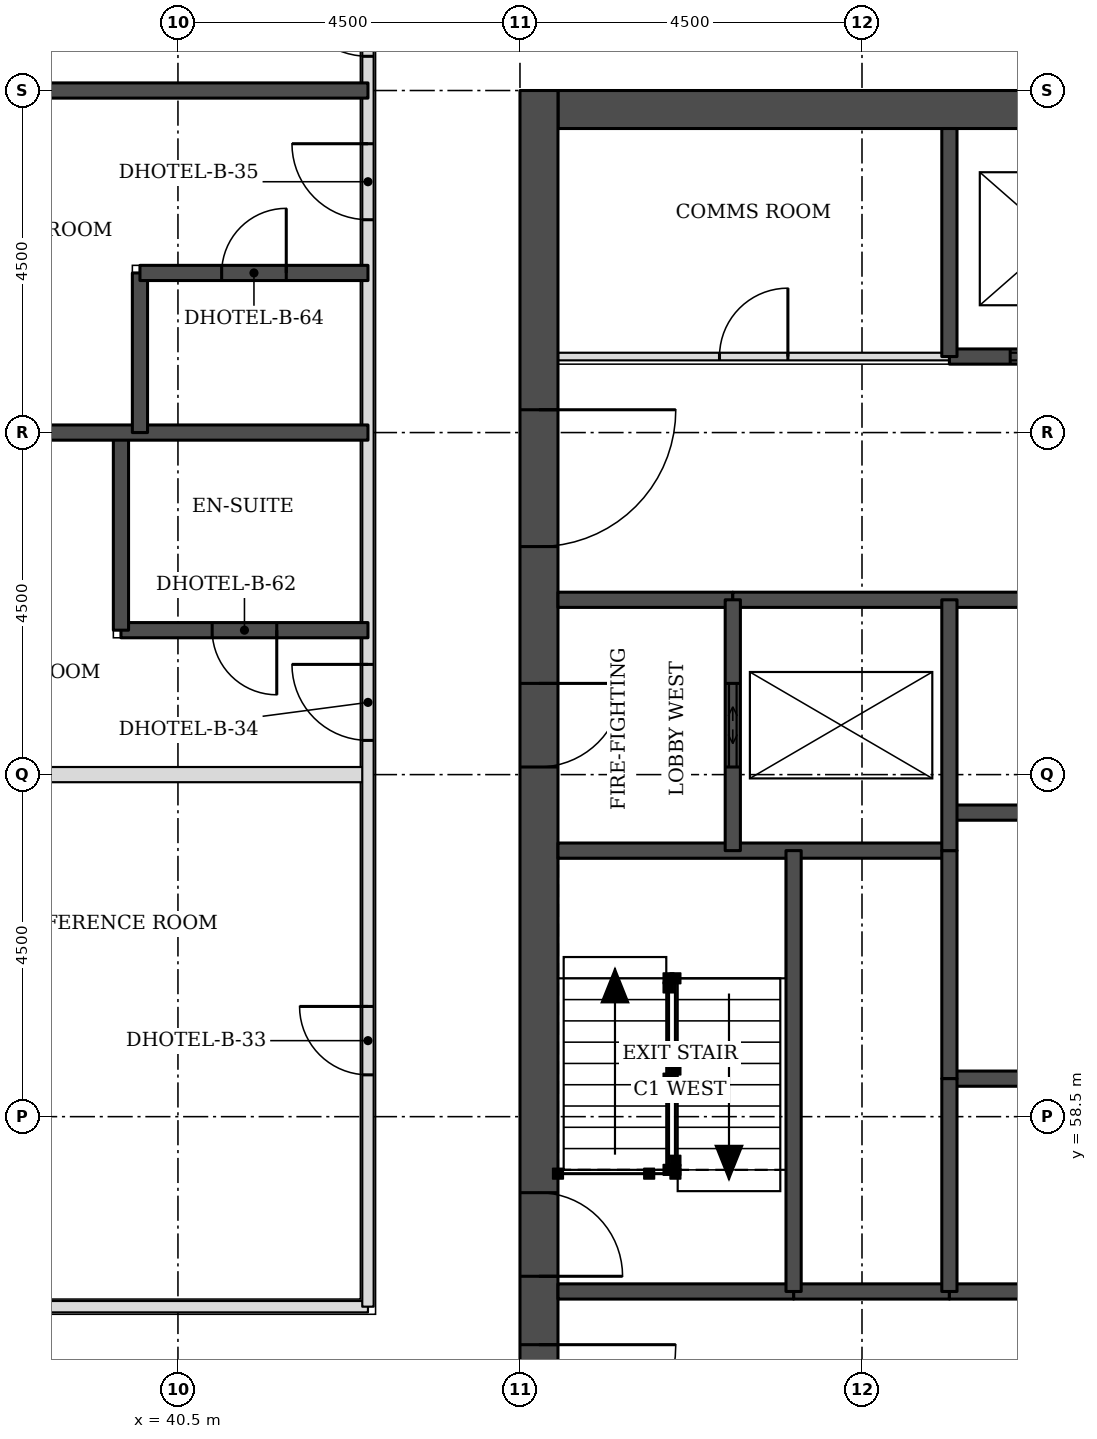
"""IFC4 building model, lengths in metres.
Left out: names, types, materials, properties, quantities, classifications, styles, units other than length and angle.
Written with IfcOpenShell. Run it as: python <this file> out.ifc"""

import sys

from ifc_helpers import new_model, si_unit, direction, frame, frame_2d, origin, place, context, subcontext, project, spatial, rectangle, extrude, element, fill, save


model = new_model("IFC4")
c1 = context("Model", 3, precision=1e-05, world=origin(), true_north=direction((0.0, 1.0)))
c2 = subcontext(c1, "Body", "Model", "MODEL_VIEW")
j1 = project(units=[si_unit("LENGTHUNIT", "METRE"), si_unit("PLANEANGLEUNIT", "RADIAN")], contexts=[c1])
p1 = place(None, origin())
s1 = spatial("IfcSite", under=j1, at=p1, CompositionType="ELEMENT")
p2 = place(p1, origin())
s2 = spatial("IfcBuilding", under=s1, at=p2, CompositionType="ELEMENT")
p3 = place(p2, frame((0.0, 0.0, 29.7)))
s3 = spatial("IfcBuildingStorey", under=s2, at=p3, CompositionType="ELEMENT", Elevation=29.7)
p4 = place(p3, frame((45.5, 71.75, 0.0), z_axis=(0.0, 0.0, 1.0), x_axis=(1.0, 0.0, 0.0)))
e1 = element("IfcWall", 1, at=p4, inside=s3, PredefinedType="SHEAR", context=c2, shape_type="SweptSolid", body=[
    extrude(rectangle(XDim=21.5, YDim=0.5, at=frame_2d((10.75, 0.0))), origin(), (0.0, 0.0, 1.0), 3.3),
])
p5 = place(p3, frame((45.25, 49.5, 0.0), z_axis=(0.0, 0.0, 1.0), x_axis=(0.0, 1.0, 0.0)))
e2 = element("IfcWall", 2, at=p5, inside=s3, PredefinedType="SHEAR", context=c2, shape_type="SweptSolid", body=[
    extrude(rectangle(XDim=22.5, YDim=0.5, at=frame_2d((11.25, 0.0))), origin(), (0.0, 0.0, 1.0), 3.3),
])
p6 = place(p5, frame((4.2, 0.0, 0.0)))
e3 = element("IfcOpeningElement", 3, at=p6, cuts=e2, PredefinedType="OPENING", context=c2, shape_type="SweptSolid", body=[
    extrude(rectangle(XDim=1.8, YDim=2.1, at=frame_2d((0.9, 1.05))), frame((0.0, 0.26, 0.0), z_axis=(0.0, -1.0, 0.0), x_axis=(1.0, 0.0, 0.0)), (0.0, 0.0, 1.0), 0.52),
])
p7 = place(p5, frame((6.9, 0.0, 0.0)))
e4 = element("IfcOpeningElement", 4, at=p7, cuts=e2, PredefinedType="OPENING", context=c2, shape_type="SweptSolid", body=[
    extrude(rectangle(XDim=1.1, YDim=2.1, at=frame_2d((0.55, 1.05))), frame((0.0, 0.26, 0.0), z_axis=(0.0, -1.0, 0.0), x_axis=(1.0, 0.0, 0.0)), (0.0, 0.0, 1.0), 0.52),
])
p8 = place(p5, frame((13.6, 0.0, 0.0)))
e5 = element("IfcOpeningElement", 5, at=p8, cuts=e2, PredefinedType="OPENING", context=c2, shape_type="SweptSolid", body=[
    extrude(rectangle(XDim=1.1, YDim=2.1, at=frame_2d((0.55, 1.05))), frame((0.0, 0.26, 0.0), z_axis=(0.0, -1.0, 0.0), x_axis=(1.0, 0.0, 0.0)), (0.0, 0.0, 1.0), 0.52),
])
p9 = place(p5, frame((16.5, 0.0, 0.0)))
e6 = element("IfcOpeningElement", 6, at=p9, cuts=e2, PredefinedType="OPENING", context=c2, shape_type="SweptSolid", body=[
    extrude(rectangle(XDim=1.8, YDim=2.1, at=frame_2d((0.9, 1.05))), frame((0.0, 0.26, 0.0), z_axis=(0.0, -1.0, 0.0), x_axis=(1.0, 0.0, 0.0)), (0.0, 0.0, 1.0), 0.52),
])
p10 = place(p3, frame((36.6, 63.0, 0.0), z_axis=(0.0, 0.0, 1.0), x_axis=(1.0, 0.0, 0.0)))
e7 = element("IfcWall", 7, at=p10, inside=s3, PredefinedType="PARTITIONING", context=c2, shape_type="SweptSolid", body=[
    extrude(rectangle(XDim=6.4, YDim=0.2, at=frame_2d((3.2, 0.0))), origin(), (0.0, 0.0, 1.0), 3.08),
])
p11 = place(p3, frame((27.0, 56.0, 0.0), z_axis=(0.0, 0.0, 1.0), x_axis=(1.0, 0.0, 0.0)))
e8 = element("IfcWall", 8, at=p11, inside=s3, PredefinedType="PARTITIONING", context=c2, shape_type="SweptSolid", body=[
    extrude(rectangle(XDim=16.0, YDim=0.15, at=frame_2d((8.0, 0.0))), origin(), (0.0, 0.0, 1.0), 3.08),
])
p12 = place(p11, frame((5.6, 0.0, 0.0)))
e9 = element("IfcOpeningElement", 9, at=p12, cuts=e8, PredefinedType="OPENING", context=c2, shape_type="SweptSolid", body=[
    extrude(rectangle(XDim=1.0, YDim=2.1, at=frame_2d((0.5, 1.05))), frame((0.0, 0.085, 0.0), z_axis=(0.0, -1.0, 0.0), x_axis=(1.0, 0.0, 0.0)), (0.0, 0.0, 1.0), 0.17),
])
p13 = place(p3, frame((43.0, 56.0, 0.0), z_axis=(0.0, 0.0, 1.0), x_axis=(0.0, 1.0, 0.0)))
e10 = element("IfcWall", 10, at=p13, inside=s3, PredefinedType="PARTITIONING", context=c2, shape_type="SweptSolid", body=[
    extrude(rectangle(XDim=18.0, YDim=0.15, at=frame_2d((9.0, 0.0))), origin(), (0.0, 0.0, 1.0), 3.08),
])
p14 = place(p13, frame((7.45, 0.0, 0.0)))
e11 = element("IfcOpeningElement", 11, at=p14, cuts=e10, PredefinedType="OPENING", context=c2, shape_type="SweptSolid", body=[
    extrude(rectangle(XDim=1.0, YDim=2.1, at=frame_2d((0.5, 1.05))), frame((0.0, 0.085, 0.0), z_axis=(0.0, -1.0, 0.0), x_axis=(1.0, 0.0, 0.0)), (0.0, 0.0, 1.0), 0.17),
])
p15 = place(p13, frame((14.3, 0.0, 0.0)))
e12 = element("IfcOpeningElement", 12, at=p15, cuts=e10, PredefinedType="OPENING", context=c2, shape_type="SweptSolid", body=[
    extrude(rectangle(XDim=1.0, YDim=2.1, at=frame_2d((0.5, 1.05))), frame((0.0, 0.085, 0.0), z_axis=(0.0, -1.0, 0.0), x_axis=(1.0, 0.0, 0.0)), (0.0, 0.0, 1.0), 0.17),
])
p16 = place(p13, frame((16.45, 0.0, 0.0)))
e13 = element("IfcOpeningElement", 13, at=p16, cuts=e10, PredefinedType="OPENING", context=c2, shape_type="SweptSolid", body=[
    extrude(rectangle(XDim=1.0, YDim=2.1, at=frame_2d((0.5, 1.05))), frame((0.0, 0.085, 0.0), z_axis=(0.0, -1.0, 0.0), x_axis=(1.0, 0.0, 0.0)), (0.0, 0.0, 1.0), 0.17),
])
p17 = place(p13, frame((3.05, 0.0, 0.0)))
e14 = element("IfcOpeningElement", 14, at=p17, cuts=e10, PredefinedType="OPENING", context=c2, shape_type="SweptSolid", body=[
    extrude(rectangle(XDim=0.9, YDim=2.1, at=frame_2d((0.45, 1.05))), frame((0.0, 0.085, 0.0), z_axis=(0.0, -1.0, 0.0), x_axis=(1.0, 0.0, 0.0)), (0.0, 0.0, 1.0), 0.17),
])
p18 = place(p3, frame((39.75, 64.9, 0.0), z_axis=(0.0, 0.0, 1.0), x_axis=(1.0, 0.0, 0.0)))
e15 = element("IfcWall", 15, at=p18, inside=s3, PredefinedType="SOLIDWALL", context=c2, shape_type="SweptSolid", body=[
    extrude(rectangle(XDim=3.25, YDim=0.2, at=frame_2d((1.625, 0.0))), origin(), (0.0, 0.0, 1.0), 3.08),
])
p19 = place(p18, frame((1.2, 0.0, 0.0)))
e16 = element("IfcOpeningElement", 16, at=p19, cuts=e15, PredefinedType="OPENING", context=c2, shape_type="SweptSolid", body=[
    extrude(rectangle(XDim=0.85, YDim=2.1, at=frame_2d((0.425, 1.05))), frame((0.0, 0.11, 0.0), z_axis=(0.0, -1.0, 0.0), x_axis=(1.0, 0.0, 0.0)), (0.0, 0.0, 1.0), 0.22),
])
p20 = place(p3, frame((39.75, 64.9, 0.0), z_axis=(0.0, 0.0, 1.0), x_axis=(0.0, 1.0, 0.0)))
e17 = element("IfcWall", 17, at=p20, inside=s3, PredefinedType="SOLIDWALL", context=c2, shape_type="SweptSolid", body=[
    extrude(rectangle(XDim=2.6, YDim=0.2, at=frame_2d((1.3, 0.0))), origin(), (0.0, 0.0, 1.0), 3.08),
])
p21 = place(p3, frame((36.6, 67.5, 0.0), z_axis=(0.0, 0.0, 1.0), x_axis=(1.0, 0.0, 0.0)))
e18 = element("IfcWall", 18, at=p21, inside=s3, PredefinedType="SOLIDWALL", context=c2, shape_type="SweptSolid", body=[
    extrude(rectangle(XDim=6.4, YDim=0.2, at=frame_2d((3.2, 0.0))), origin(), (0.0, 0.0, 1.0), 3.08),
])
p22 = place(p3, frame((40.0, 67.5, 0.0), z_axis=(0.0, 0.0, 1.0), x_axis=(0.0, 1.0, 0.0)))
e19 = element("IfcWall", 19, at=p22, inside=s3, PredefinedType="SOLIDWALL", context=c2, shape_type="SweptSolid", body=[
    extrude(rectangle(XDim=2.1, YDim=0.2, at=frame_2d((1.05, 0.0))), origin(), (0.0, 0.0, 1.0), 3.08),
])
p23 = place(p3, frame((40.0, 69.6, 0.0), z_axis=(0.0, 0.0, 1.0), x_axis=(1.0, 0.0, 0.0)))
e20 = element("IfcWall", 20, at=p23, inside=s3, PredefinedType="SOLIDWALL", context=c2, shape_type="SweptSolid", body=[
    extrude(rectangle(XDim=3.0, YDim=0.2, at=frame_2d((1.5, 0.0))), origin(), (0.0, 0.0, 1.0), 3.08),
])
p24 = place(p23, frame((1.075, 0.0, 0.0)))
e21 = element("IfcOpeningElement", 21, at=p24, cuts=e20, PredefinedType="OPENING", context=c2, shape_type="SweptSolid", body=[
    extrude(rectangle(XDim=0.85, YDim=2.1, at=frame_2d((0.425, 1.05))), frame((0.0, 0.11, 0.0), z_axis=(0.0, -1.0, 0.0), x_axis=(1.0, 0.0, 0.0)), (0.0, 0.0, 1.0), 0.22),
])
p25 = place(p3, frame((36.6, 72.0, 0.0), z_axis=(0.0, 0.0, 1.0), x_axis=(1.0, 0.0, 0.0)))
e22 = element("IfcWall", 22, at=p25, inside=s3, PredefinedType="SOLIDWALL", context=c2, shape_type="SweptSolid", body=[
    extrude(rectangle(XDim=6.4, YDim=0.2, at=frame_2d((3.2, 0.0))), origin(), (0.0, 0.0, 1.0), 3.08),
])
p26 = place(p3, frame((48.6, 56.2, 0.0), z_axis=(0.0, 0.0, 1.0), x_axis=(1.0, 0.0, 0.0)))
e23 = element("IfcWall", 23, at=p26, inside=s3, PredefinedType="SOLIDWALL", context=c2, shape_type="SweptSolid", body=[
    extrude(rectangle(XDim=2.05, YDim=0.2, at=frame_2d((1.025, 0.0))), origin(), (0.0, 0.0, 1.0), 3.08),
])
p27 = place(p3, frame((45.5, 56.2, 0.0), z_axis=(0.0, 0.0, 1.0), x_axis=(1.0, 0.0, 0.0)))
e24 = element("IfcWall", 24, at=p27, inside=s3, PredefinedType="SOLIDWALL", context=c2, shape_type="SweptSolid", body=[
    extrude(rectangle(XDim=3.1, YDim=0.2, at=frame_2d((1.55, 0.0))), origin(), (0.0, 0.0, 1.0), 3.08),
])
p28 = place(p3, frame((50.65, 56.2, 0.0), z_axis=(0.0, 0.0, 1.0), x_axis=(1.0, 0.0, 0.0)))
e25 = element("IfcWall", 25, at=p28, inside=s3, PredefinedType="SOLIDWALL", context=c2, shape_type="SweptSolid", body=[
    extrude(rectangle(XDim=11.2, YDim=0.2, at=frame_2d((5.6, 0.0))), origin(), (0.0, 0.0, 1.0), 3.08),
])
p29 = place(p3, frame((50.65, 59.0, 0.0), z_axis=(0.0, 0.0, 1.0), x_axis=(1.0, 0.0, 0.0)))
e26 = element("IfcWall", 26, at=p29, inside=s3, PredefinedType="SOLIDWALL", context=c2, shape_type="SweptSolid", body=[
    extrude(rectangle(XDim=11.2, YDim=0.2, at=frame_2d((5.6, 0.0))), origin(), (0.0, 0.0, 1.0), 3.3),
])
p30 = place(p3, frame((45.5, 62.0, 0.0), z_axis=(0.0, 0.0, 1.0), x_axis=(1.0, 0.0, 0.0)))
e27 = element("IfcWall", 27, at=p30, inside=s3, PredefinedType="SOLIDWALL", context=c2, shape_type="SweptSolid", body=[
    extrude(rectangle(XDim=5.15, YDim=0.2, at=frame_2d((2.575, 0.0))), origin(), (0.0, 0.0, 1.0), 3.08),
])
p31 = place(p3, frame((50.65, 62.5, 0.0), z_axis=(0.0, 0.0, 1.0), x_axis=(1.0, 0.0, 0.0)))
e28 = element("IfcWall", 28, at=p31, inside=s3, PredefinedType="SOLIDWALL", context=c2, shape_type="SweptSolid", body=[
    extrude(rectangle(XDim=11.2, YDim=0.2, at=frame_2d((5.6, 0.0))), origin(), (0.0, 0.0, 1.0), 3.3),
])
p32 = place(p3, frame((45.5, 65.3, 0.0), z_axis=(0.0, 0.0, 1.0), x_axis=(1.0, 0.0, 0.0)))
e29 = element("IfcWall", 29, at=p32, inside=s3, PredefinedType="SOLIDWALL", context=c2, shape_type="SweptSolid", body=[
    extrude(rectangle(XDim=2.3, YDim=0.2, at=frame_2d((1.15, 0.0))), origin(), (0.0, 0.0, 1.0), 3.08),
])
p33 = place(p3, frame((47.8, 65.3, 0.0), z_axis=(0.0, 0.0, 1.0), x_axis=(1.0, 0.0, 0.0)))
e30 = element("IfcWall", 30, at=p33, inside=s3, PredefinedType="SOLIDWALL", context=c2, shape_type="SweptSolid", body=[
    extrude(rectangle(XDim=16.9, YDim=0.2, at=frame_2d((8.45, 0.0))), origin(), (0.0, 0.0, 1.0), 3.08),
])
p34 = place(p3, frame((45.5, 68.5, 0.0), z_axis=(0.0, 0.0, 1.0), x_axis=(1.0, 0.0, 0.0)))
e31 = element("IfcWall", 31, at=p34, inside=s3, PredefinedType="PARTITIONING", context=c2, shape_type="SweptSolid", body=[
    extrude(rectangle(XDim=5.15, YDim=0.1, at=frame_2d((2.575, 0.0))), origin(), (0.0, 0.0, 1.0), 3.08),
])
p35 = place(p34, frame((2.125, 0.0, 0.0)))
e32 = element("IfcOpeningElement", 32, at=p35, cuts=e31, PredefinedType="OPENING", context=c2, shape_type="SweptSolid", body=[
    extrude(rectangle(XDim=0.9, YDim=2.1, at=frame_2d((0.45, 1.05))), frame((0.0, 0.06, 0.0), z_axis=(0.0, -1.0, 0.0), x_axis=(1.0, 0.0, 0.0)), (0.0, 0.0, 1.0), 0.12),
])
p36 = place(p3, frame((50.65, 68.5, 0.0), z_axis=(0.0, 0.0, 1.0), x_axis=(1.0, 0.0, 0.0)))
e33 = element("IfcWall", 33, at=p36, inside=s3, PredefinedType="SOLIDWALL", context=c2, shape_type="SweptSolid", body=[
    extrude(rectangle(XDim=11.2, YDim=0.2, at=frame_2d((5.6, 0.0))), origin(), (0.0, 0.0, 1.0), 3.08),
])
p37 = place(p36, frame((0.8, 0.0, 0.0)))
e34 = element("IfcOpeningElement", 34, at=p37, cuts=e33, PredefinedType="OPENING", context=c2, shape_type="SweptSolid", body=[
    extrude(rectangle(XDim=1.2, YDim=2.1, at=frame_2d((0.6, 1.05))), frame((0.0, 0.11, 0.0), z_axis=(0.0, -1.0, 0.0), x_axis=(1.0, 0.0, 0.0)), (0.0, 0.0, 1.0), 0.22),
])
p38 = place(p36, frame((3.6, 0.0, 0.0)))
e35 = element("IfcOpeningElement", 35, at=p38, cuts=e33, PredefinedType="OPENING", context=c2, shape_type="SweptSolid", body=[
    extrude(rectangle(XDim=1.2, YDim=2.1, at=frame_2d((0.6, 1.05))), frame((0.0, 0.11, 0.0), z_axis=(0.0, -1.0, 0.0), x_axis=(1.0, 0.0, 0.0)), (0.0, 0.0, 1.0), 0.22),
])
p39 = place(p36, frame((6.4, 0.0, 0.0)))
e36 = element("IfcOpeningElement", 36, at=p39, cuts=e33, PredefinedType="OPENING", context=c2, shape_type="SweptSolid", body=[
    extrude(rectangle(XDim=1.2, YDim=2.1, at=frame_2d((0.6, 1.05))), frame((0.0, 0.11, 0.0), z_axis=(0.0, -1.0, 0.0), x_axis=(1.0, 0.0, 0.0)), (0.0, 0.0, 1.0), 0.22),
])
p40 = place(p36, frame((9.2, 0.0, 0.0)))
e37 = element("IfcOpeningElement", 37, at=p40, cuts=e33, PredefinedType="OPENING", context=c2, shape_type="SweptSolid", body=[
    extrude(rectangle(XDim=1.2, YDim=2.1, at=frame_2d((0.6, 1.05))), frame((0.0, 0.11, 0.0), z_axis=(0.0, -1.0, 0.0), x_axis=(1.0, 0.0, 0.0)), (0.0, 0.0, 1.0), 0.22),
])
p41 = place(p3, frame((47.8, 62.0, 0.0), z_axis=(0.0, 0.0, 1.0), x_axis=(0.0, 1.0, 0.0)))
e38 = element("IfcWall", 38, at=p41, inside=s3, PredefinedType="SOLIDWALL", context=c2, shape_type="SweptSolid", body=[
    extrude(rectangle(XDim=3.3, YDim=0.2, at=frame_2d((1.65, 0.0))), origin(), (0.0, 0.0, 1.0), 3.08),
])
p42 = place(p41, frame((1.1, 0.0, 0.0)))
e39 = element("IfcOpeningElement", 39, at=p42, cuts=e38, PredefinedType="OPENING", context=c2, shape_type="SweptSolid", body=[
    extrude(rectangle(XDim=1.1, YDim=2.1, at=frame_2d((0.55, 1.05))), frame((0.0, 0.11, 0.0), z_axis=(0.0, -1.0, 0.0), x_axis=(1.0, 0.0, 0.0)), (0.0, 0.0, 1.0), 0.22),
])
p43 = place(p3, frame((48.6, 56.2, 0.0), z_axis=(0.0, 0.0, 1.0), x_axis=(0.0, 1.0, 0.0)))
e40 = element("IfcWall", 40, at=p43, inside=s3, PredefinedType="SOLIDWALL", context=c2, shape_type="SweptSolid", body=[
    extrude(rectangle(XDim=5.8, YDim=0.2, at=frame_2d((2.9, 0.0))), origin(), (0.0, 0.0, 1.0), 3.08),
])
p44 = place(p3, frame((50.65, 59.0, 0.0), z_axis=(0.0, 0.0, 1.0), x_axis=(0.0, 1.0, 0.0)))
e41 = element("IfcWall", 41, at=p44, inside=s3, PredefinedType="SOLIDWALL", context=c2, shape_type="SweptSolid", body=[
    extrude(rectangle(XDim=3.0, YDim=0.2, at=frame_2d((1.5, 0.0))), origin(), (0.0, 0.0, 1.0), 3.3),
])
p45 = place(p3, frame((50.65, 56.2, 0.0), z_axis=(0.0, 0.0, 1.0), x_axis=(0.0, 1.0, 0.0)))
e42 = element("IfcWall", 42, at=p45, inside=s3, PredefinedType="SOLIDWALL", context=c2, shape_type="SweptSolid", body=[
    extrude(rectangle(XDim=2.8, YDim=0.2, at=frame_2d((1.4, 0.0))), origin(), (0.0, 0.0, 1.0), 3.08),
])
p46 = place(p3, frame((50.65, 62.0, 0.0), z_axis=(0.0, 0.0, 1.0), x_axis=(0.0, 1.0, 0.0)))
e43 = element("IfcWall", 43, at=p46, inside=s3, PredefinedType="SOLIDWALL", context=c2, shape_type="SweptSolid", body=[
    extrude(rectangle(XDim=3.3, YDim=0.2, at=frame_2d((1.65, 0.0))), origin(), (0.0, 0.0, 1.0), 3.08),
])
p47 = place(p3, frame((50.65, 68.5, 0.0), z_axis=(0.0, 0.0, 1.0), x_axis=(0.0, 1.0, 0.0)))
e44 = element("IfcWall", 44, at=p47, inside=s3, PredefinedType="SOLIDWALL", context=c2, shape_type="SweptSolid", body=[
    extrude(rectangle(XDim=3.0, YDim=0.2, at=frame_2d((1.5, 0.0))), origin(), (0.0, 0.0, 1.0), 3.08),
])
p48 = place(p14, origin())
e45 = element("IfcDoor", 45, at=p48, inside=s3, OperationType="SINGLE_SWING_RIGHT", PredefinedType="DOOR", context=c2, shape_type="SweptSolid", body=[
    extrude(rectangle(XDim=1.0, YDim=2.1, at=frame_2d((0.5, 1.05))), frame((0.0, 0.025, 0.0), z_axis=(0.0, -1.0, 0.0), x_axis=(1.0, 0.0, 0.0)), (0.0, 0.0, 1.0), 0.05),
])
fill(e11, e45)
p49 = place(p19, frame((0.85, 0.0, 0.0), z_axis=(0.0, 0.0, 1.0), x_axis=(-1.0, 0.0, 0.0)))
e46 = element("IfcDoor", 46, at=p49, inside=s3, OperationType="SINGLE_SWING_LEFT", PredefinedType="DOOR", context=c2, shape_type="SweptSolid", body=[
    extrude(rectangle(XDim=0.85, YDim=2.1, at=frame_2d((0.425, 1.05))), frame((0.0, 0.025, 0.0), z_axis=(0.0, -1.0, 0.0), x_axis=(1.0, 0.0, 0.0)), (0.0, 0.0, 1.0), 0.05),
])
fill(e16, e46)
p50 = place(p15, origin())
e47 = element("IfcDoor", 47, at=p50, inside=s3, OperationType="SINGLE_SWING_RIGHT", PredefinedType="DOOR", context=c2, shape_type="SweptSolid", body=[
    extrude(rectangle(XDim=1.0, YDim=2.1, at=frame_2d((0.5, 1.05))), frame((0.0, 0.025, 0.0), z_axis=(0.0, -1.0, 0.0), x_axis=(1.0, 0.0, 0.0)), (0.0, 0.0, 1.0), 0.05),
])
fill(e12, e47)
p51 = place(p24, origin())
e48 = element("IfcDoor", 48, at=p51, inside=s3, OperationType="SINGLE_SWING_RIGHT", PredefinedType="DOOR", context=c2, shape_type="SweptSolid", body=[
    extrude(rectangle(XDim=0.85, YDim=2.1, at=frame_2d((0.425, 1.05))), frame((0.0, 0.025, 0.0), z_axis=(0.0, -1.0, 0.0), x_axis=(1.0, 0.0, 0.0)), (0.0, 0.0, 1.0), 0.05),
])
fill(e21, e48)
p52 = place(p16, origin())
e49 = element("IfcDoor", 49, at=p52, inside=s3, OperationType="SINGLE_SWING_RIGHT", PredefinedType="DOOR", context=c2, shape_type="SweptSolid", body=[
    extrude(rectangle(XDim=1.0, YDim=2.1, at=frame_2d((0.5, 1.05))), frame((0.0, 0.025, 0.0), z_axis=(0.0, -1.0, 0.0), x_axis=(1.0, 0.0, 0.0)), (0.0, 0.0, 1.0), 0.05),
])
fill(e13, e49)
p53 = place(p17, origin())
e50 = element("IfcDoor", 50, at=p53, inside=s3, OperationType="SINGLE_SWING_RIGHT", PredefinedType="DOOR", context=c2, shape_type="SweptSolid", body=[
    extrude(rectangle(XDim=0.9, YDim=2.1, at=frame_2d((0.45, 1.05))), frame((0.0, 0.025, 0.0), z_axis=(0.0, -1.0, 0.0), x_axis=(1.0, 0.0, 0.0)), (0.0, 0.0, 1.0), 0.05),
])
fill(e14, e50)
p54 = place(p37, origin())
e51 = element("IfcDoor", 51, at=p54, inside=s3, OperationType="DOUBLE_DOOR_SLIDING", PredefinedType="DOOR", context=c2, shape_type="SweptSolid", body=[
    extrude(rectangle(XDim=1.2, YDim=2.1, at=frame_2d((0.6, 1.05))), frame((0.0, 0.025, 0.0), z_axis=(0.0, -1.0, 0.0), x_axis=(1.0, 0.0, 0.0)), (0.0, 0.0, 1.0), 0.05),
])
fill(e34, e51)
p55 = place(p42, origin())
e52 = element("IfcDoor", 52, at=p55, inside=s3, OperationType="DOUBLE_DOOR_SLIDING", PredefinedType="DOOR", context=c2, shape_type="SweptSolid", body=[
    extrude(rectangle(XDim=1.1, YDim=2.1, at=frame_2d((0.55, 1.05))), frame((0.0, 0.025, 0.0), z_axis=(0.0, -1.0, 0.0), x_axis=(1.0, 0.0, 0.0)), (0.0, 0.0, 1.0), 0.05),
])
fill(e39, e52)
p56 = place(p6, frame((1.8, 0.0, 0.0), z_axis=(0.0, 0.0, 1.0), x_axis=(-1.0, 0.0, 0.0)))
e53 = element("IfcDoor", 53, at=p56, inside=s3, OperationType="SINGLE_SWING_LEFT", PredefinedType="DOOR", context=c2, shape_type="SweptSolid", body=[
    extrude(rectangle(XDim=1.8, YDim=2.1, at=frame_2d((0.9, 1.05))), frame((0.0, 0.025, 0.0), z_axis=(0.0, -1.0, 0.0), x_axis=(1.0, 0.0, 0.0)), (0.0, 0.0, 1.0), 0.05),
])
fill(e3, e53)
p57 = place(p7, frame((1.1, 0.0, 0.0), z_axis=(0.0, 0.0, 1.0), x_axis=(-1.0, 0.0, 0.0)))
e54 = element("IfcDoor", 54, at=p57, inside=s3, OperationType="SINGLE_SWING_RIGHT", PredefinedType="DOOR", context=c2, shape_type="SweptSolid", body=[
    extrude(rectangle(XDim=1.1, YDim=2.1, at=frame_2d((0.55, 1.05))), frame((0.0, 0.025, 0.0), z_axis=(0.0, -1.0, 0.0), x_axis=(1.0, 0.0, 0.0)), (0.0, 0.0, 1.0), 0.05),
])
fill(e4, e54)
p58 = place(p8, frame((1.1, 0.0, 0.0), z_axis=(0.0, 0.0, 1.0), x_axis=(-1.0, 0.0, 0.0)))
e55 = element("IfcDoor", 55, at=p58, inside=s3, OperationType="SINGLE_SWING_LEFT", PredefinedType="DOOR", context=c2, shape_type="SweptSolid", body=[
    extrude(rectangle(XDim=1.1, YDim=2.1, at=frame_2d((0.55, 1.05))), frame((0.0, 0.025, 0.0), z_axis=(0.0, -1.0, 0.0), x_axis=(1.0, 0.0, 0.0)), (0.0, 0.0, 1.0), 0.05),
])
fill(e5, e55)
p59 = place(p9, frame((1.8, 0.0, 0.0), z_axis=(0.0, 0.0, 1.0), x_axis=(-1.0, 0.0, 0.0)))
e56 = element("IfcDoor", 56, at=p59, inside=s3, OperationType="SINGLE_SWING_LEFT", PredefinedType="DOOR", context=c2, shape_type="SweptSolid", body=[
    extrude(rectangle(XDim=1.8, YDim=2.1, at=frame_2d((0.9, 1.05))), frame((0.0, 0.025, 0.0), z_axis=(0.0, -1.0, 0.0), x_axis=(1.0, 0.0, 0.0)), (0.0, 0.0, 1.0), 0.05),
])
fill(e6, e56)
p60 = place(p35, origin())
e57 = element("IfcDoor", 57, at=p60, inside=s3, OperationType="SINGLE_SWING_RIGHT", PredefinedType="DOOR", context=c2, shape_type="SweptSolid", body=[
    extrude(rectangle(XDim=0.9, YDim=2.1, at=frame_2d((0.45, 1.05))), frame((0.0, 0.025, 0.0), z_axis=(0.0, -1.0, 0.0), x_axis=(1.0, 0.0, 0.0)), (0.0, 0.0, 1.0), 0.05),
])
fill(e32, e57)
save(model, sys.argv[1])
